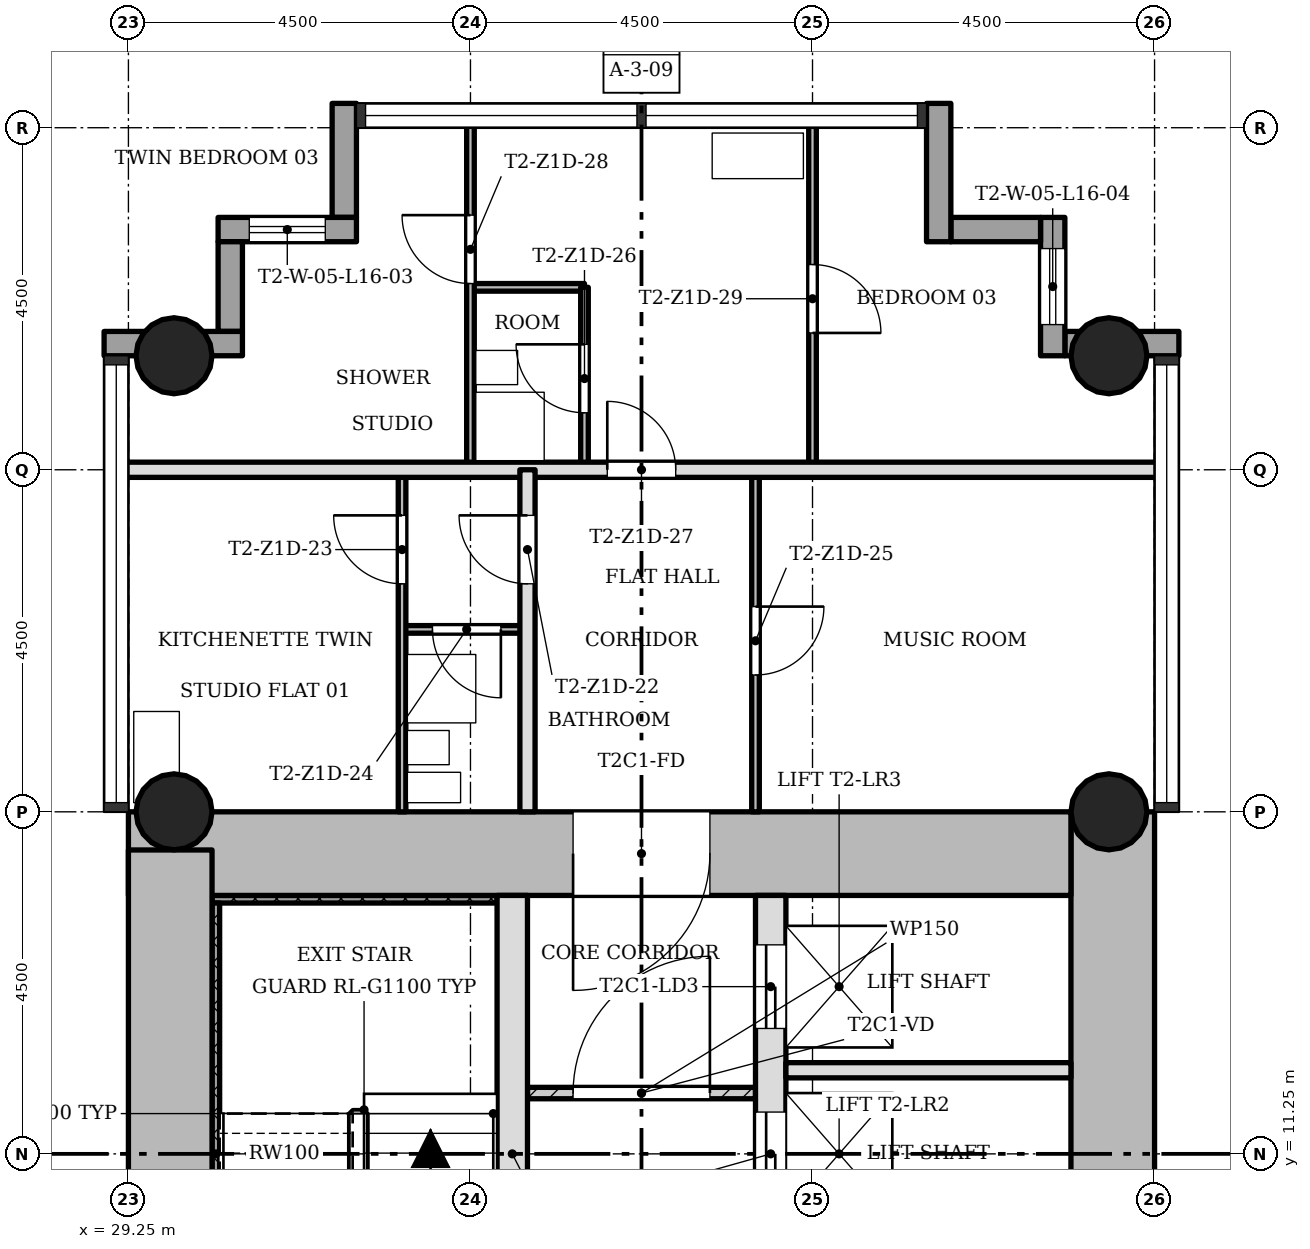
"""IFC4 building model, lengths in metres.
Left out: names, types, materials, properties, quantities, classifications, styles, units other than length and angle.
Written with IfcOpenShell. Run it as: python <this file> out.ifc"""

import sys

from ifc_helpers import new_model, si_unit, direction, frame, frame_2d, origin, origin_2d, place, context, subcontext, project, spatial, rectangle, hollow_circle, extrude, element, fill, save


model = new_model("IFC4")
c1 = context("Model", 3, precision=1e-05, world=origin(), true_north=direction((0.0, 1.0)))
c2 = subcontext(c1, "Body", "Model", "MODEL_VIEW")
j1 = project(units=[si_unit("LENGTHUNIT", "METRE"), si_unit("PLANEANGLEUNIT", "RADIAN")], contexts=[c1])
p1 = place(None, origin())
s1 = spatial("IfcSite", under=j1, at=p1, CompositionType="ELEMENT")
p2 = place(p1, origin())
s2 = spatial("IfcBuilding", under=s1, at=p2, CompositionType="ELEMENT")
p3 = place(p2, frame((0.0, 0.0, 61.9)))
s3 = spatial("IfcBuildingStorey", under=s2, at=p3, CompositionType="ELEMENT", Elevation=61.9)
p4 = place(p3, frame((42.2, 7.85, 0.0), z_axis=(0.0, 0.0, 1.0), x_axis=(0.0, 1.0, 0.0)))
e1 = element("IfcWall", 1, at=p4, inside=s3, PredefinedType="SHEAR", context=c2, shape_type="SweptSolid", body=[
    extrude(rectangle(XDim=7.9, YDim=1.1, at=frame_2d((3.95, 0.0))), origin(), (0.0, 0.0, 1.0), 3.4),
])
p5 = place(p3, frame((41.65, 15.2, 0.0), z_axis=(0.0, 0.0, 1.0), x_axis=(-1.0, 0.0, 0.0)))
e2 = element("IfcWall", 2, at=p5, inside=s3, PredefinedType="SHEAR", context=c2, shape_type="SweptSolid", body=[
    extrude(rectangle(XDim=12.4, YDim=1.1, at=frame_2d((6.2, 0.0))), origin(), (0.0, 0.0, 1.0), 3.4),
])
p6 = place(p5, frame((4.75, 0.0, 0.0)))
e3 = element("IfcOpeningElement", 3, at=p6, cuts=e2, PredefinedType="OPENING", context=c2, shape_type="SweptSolid", body=[
    extrude(rectangle(XDim=1.8, YDim=2.1, at=frame_2d((0.9, 1.05))), frame((0.0, 0.56, 0.0), z_axis=(0.0, -1.0, 0.0), x_axis=(1.0, 0.0, 0.0)), (0.0, 0.0, 1.0), 1.12),
])
p7 = place(p3, frame((29.8, 15.248, 0.0), z_axis=(0.0, 0.0, 1.0), x_axis=(0.0, -1.0, 0.0)))
e4 = element("IfcWall", 4, at=p7, inside=s3, PredefinedType="SHEAR", context=c2, shape_type="SweptSolid", body=[
    extrude(rectangle(XDim=8.596, YDim=1.1, at=frame_2d((4.298, 0.0))), origin(), (0.0, 0.0, 1.0), 3.4),
])
p8 = place(p3, frame((34.3, 7.85, 0.0), z_axis=(0.0, 0.0, 1.0), x_axis=(0.0, 1.0, 0.0)))
e5 = element("IfcWall", 5, at=p8, inside=s3, PredefinedType="SHEAR", context=c2, shape_type="SweptSolid", body=[
    extrude(rectangle(XDim=6.8, YDim=0.4, at=frame_2d((3.4, 0.0))), origin(), (0.0, 0.0, 1.0), 3.4),
])
p9 = place(p8, frame((0.55, 0.0, 0.0)))
e6 = element("IfcOpeningElement", 6, at=p9, cuts=e5, PredefinedType="OPENING", context=c2, shape_type="SweptSolid", body=[
    extrude(rectangle(XDim=0.9, YDim=2.1, at=frame_2d((0.45, 1.05))), frame((0.0, 0.21, 0.0), z_axis=(0.0, -1.0, 0.0), x_axis=(1.0, 0.0, 0.0)), (0.0, 0.0, 1.0), 0.42),
])
p10 = place(p3, frame((37.7, 7.85, 0.0), z_axis=(0.0, 0.0, 1.0), x_axis=(0.0, 1.0, 0.0)))
e7 = element("IfcWall", 7, at=p10, inside=s3, PredefinedType="SHEAR", context=c2, shape_type="SweptSolid", body=[
    extrude(rectangle(XDim=6.8, YDim=0.4, at=frame_2d((3.4, 0.0))), origin(), (0.0, 0.0, 1.0), 3.4),
])
p11 = place(p10, frame((0.65, 0.0, 0.0)))
e8 = element("IfcOpeningElement", 8, at=p11, cuts=e7, PredefinedType="OPENING", context=c2, shape_type="SweptSolid", body=[
    extrude(rectangle(XDim=1.1, YDim=2.1, at=frame_2d((0.55, 1.05))), frame((0.0, 0.21, 0.0), z_axis=(0.0, -1.0, 0.0), x_axis=(1.0, 0.0, 0.0)), (0.0, 0.0, 1.0), 0.42),
])
p12 = place(p10, frame((2.85, 0.0, 0.0)))
e9 = element("IfcOpeningElement", 9, at=p12, cuts=e7, PredefinedType="OPENING", context=c2, shape_type="SweptSolid", body=[
    extrude(rectangle(XDim=1.1, YDim=2.1, at=frame_2d((0.55, 1.05))), frame((0.0, 0.21, 0.0), z_axis=(0.0, -1.0, 0.0), x_axis=(1.0, 0.0, 0.0)), (0.0, 0.0, 1.0), 0.42),
])
p13 = place(p10, frame((5.05, 0.0, 0.0)))
e10 = element("IfcOpeningElement", 10, at=p13, cuts=e7, PredefinedType="OPENING", context=c2, shape_type="SweptSolid", body=[
    extrude(rectangle(XDim=1.1, YDim=2.1, at=frame_2d((0.55, 1.05))), frame((0.0, 0.21, 0.0), z_axis=(0.0, -1.0, 0.0), x_axis=(1.0, 0.0, 0.0)), (0.0, 0.0, 1.0), 0.42),
])
for number, where, z_axis, x_axis in (
    (11, (42.15, 15.75, 0.0), (0.0, 0.0, 1.0), (1.0, 0.0, 0.0)),
    (12, (29.85, 15.75, 0.0), (0.0, 0.0, 1.0), (1.0, 0.0, 0.0)),
    (13, (42.15, 21.75, 0.0), (0.0, 0.0, 1.0), (1.0, 0.0, 0.0)),
    (14, (29.85, 21.75, 0.0), (0.0, 0.0, 1.0), (1.0, 0.0, 0.0)),
):
    element("IfcColumn", number, at=place(p3, frame(where, z_axis=z_axis, x_axis=x_axis)), inside=s3, PredefinedType="COLUMN", context=c2, shape_type="SweptSolid", body=[
        extrude(hollow_circle(Radius=0.5, WallThickness=0.036, at=origin_2d()), origin(), (0.0, 0.0, 1.0), 3.4),
    ])
p14 = place(p3, frame((43.07, 21.91, -0.3), z_axis=(0.0, 0.0, 1.0), x_axis=(-1.0, 0.0, 0.0)))
e15 = element("IfcWall", 15, at=p14, inside=s3, PredefinedType="STANDARD", context=c2, shape_type="SweptSolid", body=[
    extrude(rectangle(XDim=1.5, YDim=0.32, at=frame_2d((0.75, 0.0))), origin(), (0.0, 0.0, 1.0), 3.4),
])
p15 = place(p3, frame((41.41, 21.75, -0.3), z_axis=(0.0, 0.0, 1.0), x_axis=(0.0, 1.0, 0.0)))
e16 = element("IfcWall", 16, at=p15, inside=s3, PredefinedType="STANDARD", context=c2, shape_type="SweptSolid", body=[
    extrude(rectangle(XDim=1.82, YDim=0.32, at=frame_2d((0.91, 0.0))), origin(), (0.0, 0.0, 1.0), 3.4),
])
p16 = place(p15, frame((0.41, 0.0, 1.2)))
e17 = element("IfcOpeningElement", 17, at=p16, cuts=e16, PredefinedType="OPENING", context=c2, shape_type="SweptSolid", body=[
    extrude(rectangle(XDim=1.0, YDim=1.5, at=frame_2d((0.5, 0.75))), frame((0.0, 0.17, 0.0), z_axis=(0.0, -1.0, 0.0), x_axis=(1.0, 0.0, 0.0)), (0.0, 0.0, 1.0), 0.34),
])
p17 = place(p3, frame((41.25, 23.41, -0.3), z_axis=(0.0, 0.0, 1.0), x_axis=(-1.0, 0.0, 0.0)))
e18 = element("IfcWall", 18, at=p17, inside=s3, PredefinedType="STANDARD", context=c2, shape_type="SweptSolid", body=[
    extrude(rectangle(XDim=1.18, YDim=0.32, at=frame_2d((0.59, 0.0))), origin(), (0.0, 0.0, 1.0), 3.4),
])
p18 = place(p3, frame((39.91, 23.25, -0.3), z_axis=(0.0, 0.0, 1.0), x_axis=(0.0, 1.0, 0.0)))
e19 = element("IfcWall", 19, at=p18, inside=s3, PredefinedType="STANDARD", context=c2, shape_type="SweptSolid", body=[
    extrude(rectangle(XDim=1.82, YDim=0.32, at=frame_2d((0.91, 0.0))), origin(), (0.0, 0.0, 1.0), 3.4),
])
p19 = place(p3, frame((32.09, 25.07, -0.3), z_axis=(0.0, 0.0, 1.0), x_axis=(0.0, -1.0, 0.0)))
e20 = element("IfcWall", 20, at=p19, inside=s3, PredefinedType="STANDARD", context=c2, shape_type="SweptSolid", body=[
    extrude(rectangle(XDim=1.5, YDim=0.32, at=frame_2d((0.75, 0.0))), origin(), (0.0, 0.0, 1.0), 3.4),
])
p20 = place(p3, frame((32.25, 23.41, -0.3), z_axis=(0.0, 0.0, 1.0), x_axis=(-1.0, 0.0, 0.0)))
e21 = element("IfcWall", 21, at=p20, inside=s3, PredefinedType="STANDARD", context=c2, shape_type="SweptSolid", body=[
    extrude(rectangle(XDim=1.82, YDim=0.32, at=frame_2d((0.91, 0.0))), origin(), (0.0, 0.0, 1.0), 3.4),
])
p21 = place(p20, frame((0.41, 0.0, 1.2)))
e22 = element("IfcOpeningElement", 22, at=p21, cuts=e21, PredefinedType="OPENING", context=c2, shape_type="SweptSolid", body=[
    extrude(rectangle(XDim=1.0, YDim=1.5, at=frame_2d((0.5, 0.75))), frame((0.0, 0.17, 0.0), z_axis=(0.0, -1.0, 0.0), x_axis=(1.0, 0.0, 0.0)), (0.0, 0.0, 1.0), 0.34),
])
p22 = place(p3, frame((30.59, 23.25, -0.3), z_axis=(0.0, 0.0, 1.0), x_axis=(0.0, -1.0, 0.0)))
e23 = element("IfcWall", 23, at=p22, inside=s3, PredefinedType="STANDARD", context=c2, shape_type="SweptSolid", body=[
    extrude(rectangle(XDim=1.18, YDim=0.32, at=frame_2d((0.59, 0.0))), origin(), (0.0, 0.0, 1.0), 3.4),
])
p23 = place(p3, frame((30.75, 21.91, -0.3), z_axis=(0.0, 0.0, 1.0), x_axis=(-1.0, 0.0, 0.0)))
e24 = element("IfcWall", 24, at=p23, inside=s3, PredefinedType="STANDARD", context=c2, shape_type="SweptSolid", body=[
    extrude(rectangle(XDim=1.82, YDim=0.32, at=frame_2d((0.91, 0.0))), origin(), (0.0, 0.0, 1.0), 3.4),
])
p24 = place(p3, frame((37.5, 12.05, 0.0), z_axis=(0.0, 0.0, 1.0), x_axis=(-1.0, 0.0, 0.0)))
e25 = element("IfcWall", 25, at=p24, inside=s3, PredefinedType="PARTITIONING", context=c2, shape_type="SweptSolid", body=[
    extrude(rectangle(XDim=3.0, YDim=0.15, at=frame_2d((1.5, 0.0))), origin(), (0.0, 0.0, 1.0), 3.0),
])
p25 = place(p24, frame((0.6, 0.0, 0.0)))
e26 = element("IfcOpeningElement", 26, at=p25, cuts=e25, PredefinedType="OPENING", context=c2, shape_type="SweptSolid", body=[
    extrude(rectangle(XDim=1.8, YDim=2.1, at=frame_2d((0.9, 1.05))), frame((0.0, 0.085, 0.0), z_axis=(0.0, -1.0, 0.0), x_axis=(1.0, 0.0, 0.0)), (0.0, 0.0, 1.0), 0.17),
])
p26 = place(p3, frame((41.65, 12.35, 0.0), z_axis=(0.0, 0.0, 1.0), x_axis=(-1.0, 0.0, 0.0)))
e27 = element("IfcWall", 27, at=p26, inside=s3, PredefinedType="SOLIDWALL", context=c2, shape_type="SweptSolid", body=[
    extrude(rectangle(XDim=3.75, YDim=0.2, at=frame_2d((1.875, 0.0))), origin(), (0.0, 0.0, 1.0), 3.0),
])
p27 = place(p3, frame((34.5, 18.15, 0.0), z_axis=(0.0, 0.0, 1.0), x_axis=(-1.0, 0.0, 0.0)))
e28 = element("IfcWall", 28, at=p27, inside=s3, PredefinedType="PARTITIONING", context=c2, shape_type="SweptSolid", body=[
    extrude(rectangle(XDim=1.65, YDim=0.1, at=frame_2d((0.825, 0.0))), origin(), (0.0, 0.0, 1.0), 3.0),
])
p28 = place(p27, frame((0.35, 0.0, 0.0)))
e29 = element("IfcOpeningElement", 29, at=p28, cuts=e28, PredefinedType="OPENING", context=c2, shape_type="SweptSolid", body=[
    extrude(rectangle(XDim=0.9, YDim=2.1, at=frame_2d((0.45, 1.05))), frame((0.0, 0.06, 0.0), z_axis=(0.0, -1.0, 0.0), x_axis=(1.0, 0.0, 0.0)), (0.0, 0.0, 1.0), 0.12),
])
p29 = place(p3, frame((42.85, 20.25, 0.0), z_axis=(0.0, 0.0, 1.0), x_axis=(-1.0, 0.0, 0.0)))
e30 = element("IfcWall", 30, at=p29, inside=s3, PredefinedType="SOLIDWALL", context=c2, shape_type="SweptSolid", body=[
    extrude(rectangle(XDim=13.7, YDim=0.2, at=frame_2d((6.85, 0.0))), origin(), (0.0, 0.0, 1.0), 3.0),
])
p30 = place(p29, frame((6.4, 0.0, 0.0)))
e31 = element("IfcOpeningElement", 31, at=p30, cuts=e30, PredefinedType="OPENING", context=c2, shape_type="SweptSolid", body=[
    extrude(rectangle(XDim=0.9, YDim=2.1, at=frame_2d((0.45, 1.05))), frame((0.0, 0.11, 0.0), z_axis=(0.0, -1.0, 0.0), x_axis=(1.0, 0.0, 0.0)), (0.0, 0.0, 1.0), 0.22),
])
p31 = place(p3, frame((35.25, 22.65, 0.0), z_axis=(0.0, 0.0, 1.0), x_axis=(-1.0, 0.0, 0.0)))
e32 = element("IfcWall", 32, at=p31, inside=s3, PredefinedType="PARTITIONING", context=c2, shape_type="SweptSolid", body=[
    extrude(rectangle(XDim=1.5, YDim=0.1, at=frame_2d((0.75, 0.0))), origin(), (0.0, 0.0, 1.0), 3.0),
])
p32 = place(p3, frame((38.25, 20.25, 0.0), z_axis=(0.0, 0.0, 1.0), x_axis=(0.0, 1.0, 0.0)))
e33 = element("IfcWall", 33, at=p32, inside=s3, PredefinedType="PARTITIONING", context=c2, shape_type="SweptSolid", body=[
    extrude(rectangle(XDim=4.6, YDim=0.1, at=frame_2d((2.3, 0.0))), origin(), (0.0, 0.0, 1.0), 3.0),
])
p33 = place(p32, frame((1.8, 0.0, 0.0)))
e34 = element("IfcOpeningElement", 34, at=p33, cuts=e33, PredefinedType="OPENING", context=c2, shape_type="SweptSolid", body=[
    extrude(rectangle(XDim=0.9, YDim=2.1, at=frame_2d((0.45, 1.05))), frame((0.0, 0.06, 0.0), z_axis=(0.0, -1.0, 0.0), x_axis=(1.0, 0.0, 0.0)), (0.0, 0.0, 1.0), 0.12),
])
p34 = place(p3, frame((37.5, 15.75, 0.0), z_axis=(0.0, 0.0, 1.0), x_axis=(0.0, 1.0, 0.0)))
e35 = element("IfcWall", 35, at=p34, inside=s3, PredefinedType="PARTITIONING", context=c2, shape_type="SweptSolid", body=[
    extrude(rectangle(XDim=4.5, YDim=0.1, at=frame_2d((2.25, 0.0))), origin(), (0.0, 0.0, 1.0), 3.0),
])
p35 = place(p34, frame((1.8, 0.0, 0.0)))
e36 = element("IfcOpeningElement", 36, at=p35, cuts=e35, PredefinedType="OPENING", context=c2, shape_type="SweptSolid", body=[
    extrude(rectangle(XDim=0.9, YDim=2.1, at=frame_2d((0.45, 1.05))), frame((0.0, 0.06, 0.0), z_axis=(0.0, -1.0, 0.0), x_axis=(1.0, 0.0, 0.0)), (0.0, 0.0, 1.0), 0.12),
])
p36 = place(p3, frame((35.25, 20.25, 0.0), z_axis=(0.0, 0.0, 1.0), x_axis=(0.0, 1.0, 0.0)))
e37 = element("IfcWall", 37, at=p36, inside=s3, PredefinedType="PARTITIONING", context=c2, shape_type="SweptSolid", body=[
    extrude(rectangle(XDim=2.4, YDim=0.1, at=frame_2d((1.2, 0.0))), origin(), (0.0, 0.0, 1.0), 3.0),
])
p37 = place(p36, frame((0.75, 0.0, 0.0)))
e38 = element("IfcOpeningElement", 38, at=p37, cuts=e37, PredefinedType="OPENING", context=c2, shape_type="SweptSolid", body=[
    extrude(rectangle(XDim=0.9, YDim=2.1, at=frame_2d((0.45, 1.05))), frame((0.0, 0.06, 0.0), z_axis=(0.0, -1.0, 0.0), x_axis=(1.0, 0.0, 0.0)), (0.0, 0.0, 1.0), 0.12),
])
p38 = place(p3, frame((34.5, 15.75, 0.0), z_axis=(0.0, 0.0, 1.0), x_axis=(0.0, 1.0, 0.0)))
e39 = element("IfcWall", 39, at=p38, inside=s3, PredefinedType="SOLIDWALL", context=c2, shape_type="SweptSolid", body=[
    extrude(rectangle(XDim=4.5, YDim=0.2, at=frame_2d((2.25, 0.0))), origin(), (0.0, 0.0, 1.0), 3.0),
])
p39 = place(p38, frame((3.0, 0.0, 0.0)))
e40 = element("IfcOpeningElement", 40, at=p39, cuts=e39, PredefinedType="OPENING", context=c2, shape_type="SweptSolid", body=[
    extrude(rectangle(XDim=0.9, YDim=2.1, at=frame_2d((0.45, 1.05))), frame((0.0, 0.11, 0.0), z_axis=(0.0, -1.0, 0.0), x_axis=(1.0, 0.0, 0.0)), (0.0, 0.0, 1.0), 0.22),
])
p40 = place(p3, frame((33.75, 20.25, 0.0), z_axis=(0.0, 0.0, 1.0), x_axis=(0.0, 1.0, 0.0)))
e41 = element("IfcWall", 41, at=p40, inside=s3, PredefinedType="PARTITIONING", context=c2, shape_type="SweptSolid", body=[
    extrude(rectangle(XDim=4.6, YDim=0.1, at=frame_2d((2.3, 0.0))), origin(), (0.0, 0.0, 1.0), 3.0),
])
p41 = place(p40, frame((2.45, 0.0, 0.0)))
e42 = element("IfcOpeningElement", 42, at=p41, cuts=e41, PredefinedType="OPENING", context=c2, shape_type="SweptSolid", body=[
    extrude(rectangle(XDim=0.9, YDim=2.1, at=frame_2d((0.45, 1.05))), frame((0.0, 0.06, 0.0), z_axis=(0.0, -1.0, 0.0), x_axis=(1.0, 0.0, 0.0)), (0.0, 0.0, 1.0), 0.12),
])
p42 = place(p3, frame((32.85, 15.75, 0.0), z_axis=(0.0, 0.0, 1.0), x_axis=(0.0, 1.0, 0.0)))
e43 = element("IfcWall", 43, at=p42, inside=s3, PredefinedType="PARTITIONING", context=c2, shape_type="SweptSolid", body=[
    extrude(rectangle(XDim=4.5, YDim=0.1, at=frame_2d((2.25, 0.0))), origin(), (0.0, 0.0, 1.0), 3.0),
])
p43 = place(p42, frame((3.0, 0.0, 0.0)))
e44 = element("IfcOpeningElement", 44, at=p43, cuts=e43, PredefinedType="OPENING", context=c2, shape_type="SweptSolid", body=[
    extrude(rectangle(XDim=0.9, YDim=2.1, at=frame_2d((0.45, 1.05))), frame((0.0, 0.06, 0.0), z_axis=(0.0, -1.0, 0.0), x_axis=(1.0, 0.0, 0.0)), (0.0, 0.0, 1.0), 0.12),
])
p44 = place(p3, frame((34.1, 14.6, 0.0), z_axis=(0.0, 0.0, 1.0), x_axis=(-1.0, 0.0, 0.0)))
e45 = element("IfcWall", 45, at=p44, inside=s3, PredefinedType="SHEAR", context=c2, shape_type="SweptSolid", body=[
    extrude(rectangle(XDim=3.75, YDim=0.1, at=frame_2d((1.875, 0.0))), origin(), (0.0, 0.0, 1.0), 3.4),
])
p45 = place(p3, frame((30.4, 7.95, 0.0), z_axis=(0.0, 0.0, 1.0), x_axis=(0.0, 1.0, 0.0)))
e46 = element("IfcWall", 46, at=p45, inside=s3, PredefinedType="SHEAR", context=c2, shape_type="SweptSolid", body=[
    extrude(rectangle(XDim=6.6, YDim=0.1, at=frame_2d((3.3, 0.0))), origin(), (0.0, 0.0, 1.0), 3.4),
])
p46 = place(p25, origin())
e47 = element("IfcDoor", 47, at=p46, inside=s3, OperationType="SINGLE_SWING_LEFT", PredefinedType="DOOR", context=c2, shape_type="SweptSolid", body=[
    extrude(rectangle(XDim=1.8, YDim=2.1, at=frame_2d((0.9, 1.05))), frame((0.0, 0.025, 0.0), z_axis=(0.0, -1.0, 0.0), x_axis=(1.0, 0.0, 0.0)), (0.0, 0.0, 1.0), 0.05),
])
fill(e26, e47)
p47 = place(p39, origin())
e48 = element("IfcDoor", 48, at=p47, inside=s3, OperationType="SINGLE_SWING_LEFT", PredefinedType="DOOR", context=c2, shape_type="SweptSolid", body=[
    extrude(rectangle(XDim=0.9, YDim=2.1, at=frame_2d((0.45, 1.05))), frame((0.0, 0.025, 0.0), z_axis=(0.0, -1.0, 0.0), x_axis=(1.0, 0.0, 0.0)), (0.0, 0.0, 1.0), 0.05),
])
fill(e40, e48)
p48 = place(p43, origin())
e49 = element("IfcDoor", 49, at=p48, inside=s3, OperationType="SINGLE_SWING_LEFT", PredefinedType="DOOR", context=c2, shape_type="SweptSolid", body=[
    extrude(rectangle(XDim=0.9, YDim=2.1, at=frame_2d((0.45, 1.05))), frame((0.0, 0.025, 0.0), z_axis=(0.0, -1.0, 0.0), x_axis=(1.0, 0.0, 0.0)), (0.0, 0.0, 1.0), 0.05),
])
fill(e44, e49)
p49 = place(p28, origin())
e50 = element("IfcDoor", 50, at=p49, inside=s3, OperationType="SINGLE_SWING_RIGHT", PredefinedType="DOOR", context=c2, shape_type="SweptSolid", body=[
    extrude(rectangle(XDim=0.9, YDim=2.1, at=frame_2d((0.45, 1.05))), frame((0.0, 0.025, 0.0), z_axis=(0.0, -1.0, 0.0), x_axis=(1.0, 0.0, 0.0)), (0.0, 0.0, 1.0), 0.05),
])
fill(e29, e50)
p50 = place(p35, origin())
e51 = element("IfcDoor", 51, at=p50, inside=s3, OperationType="SINGLE_SWING_RIGHT", PredefinedType="DOOR", context=c2, shape_type="SweptSolid", body=[
    extrude(rectangle(XDim=0.9, YDim=2.1, at=frame_2d((0.45, 1.05))), frame((0.0, 0.025, 0.0), z_axis=(0.0, -1.0, 0.0), x_axis=(1.0, 0.0, 0.0)), (0.0, 0.0, 1.0), 0.05),
])
fill(e36, e51)
p51 = place(p37, origin())
e52 = element("IfcDoor", 52, at=p51, inside=s3, OperationType="SINGLE_SWING_LEFT", PredefinedType="DOOR", context=c2, shape_type="SweptSolid", body=[
    extrude(rectangle(XDim=0.9, YDim=2.1, at=frame_2d((0.45, 1.05))), frame((0.0, 0.025, 0.0), z_axis=(0.0, -1.0, 0.0), x_axis=(1.0, 0.0, 0.0)), (0.0, 0.0, 1.0), 0.05),
])
fill(e38, e52)
p52 = place(p30, origin())
e53 = element("IfcDoor", 53, at=p52, inside=s3, OperationType="SINGLE_SWING_RIGHT", PredefinedType="DOOR", context=c2, shape_type="SweptSolid", body=[
    extrude(rectangle(XDim=0.9, YDim=2.1, at=frame_2d((0.45, 1.05))), frame((0.0, 0.025, 0.0), z_axis=(0.0, -1.0, 0.0), x_axis=(1.0, 0.0, 0.0)), (0.0, 0.0, 1.0), 0.05),
])
fill(e31, e53)
p53 = place(p41, origin())
e54 = element("IfcDoor", 54, at=p53, inside=s3, OperationType="SINGLE_SWING_LEFT", PredefinedType="DOOR", context=c2, shape_type="SweptSolid", body=[
    extrude(rectangle(XDim=0.9, YDim=2.1, at=frame_2d((0.45, 1.05))), frame((0.0, 0.025, 0.0), z_axis=(0.0, -1.0, 0.0), x_axis=(1.0, 0.0, 0.0)), (0.0, 0.0, 1.0), 0.05),
])
fill(e42, e54)
p54 = place(p33, origin())
e55 = element("IfcDoor", 55, at=p54, inside=s3, OperationType="SINGLE_SWING_LEFT", PredefinedType="DOOR", context=c2, shape_type="SweptSolid", body=[
    extrude(rectangle(XDim=0.9, YDim=2.1, at=frame_2d((0.45, 1.05))), frame((0.0, 0.025, 0.0), z_axis=(0.0, -1.0, 0.0), x_axis=(1.0, 0.0, 0.0)), (0.0, 0.0, 1.0), 0.05),
])
fill(e34, e55)
p55 = place(p12, origin())
e56 = element("IfcDoor", 56, at=p55, inside=s3, OperationType="SLIDING_TO_LEFT", PredefinedType="DOOR", context=c2, shape_type="SweptSolid", body=[
    extrude(rectangle(XDim=1.1, YDim=2.1, at=frame_2d((0.55, 1.05))), frame((0.0, 0.025, 0.0), z_axis=(0.0, -1.0, 0.0), x_axis=(1.0, 0.0, 0.0)), (0.0, 0.0, 1.0), 0.05),
])
fill(e9, e56)
p56 = place(p13, origin())
e57 = element("IfcDoor", 57, at=p56, inside=s3, OperationType="SLIDING_TO_LEFT", PredefinedType="DOOR", context=c2, shape_type="SweptSolid", body=[
    extrude(rectangle(XDim=1.1, YDim=2.1, at=frame_2d((0.55, 1.05))), frame((0.0, 0.025, 0.0), z_axis=(0.0, -1.0, 0.0), x_axis=(1.0, 0.0, 0.0)), (0.0, 0.0, 1.0), 0.05),
])
fill(e10, e57)
p57 = place(p6, origin())
e58 = element("IfcDoor", 58, at=p57, inside=s3, OperationType="SINGLE_SWING_LEFT", PredefinedType="DOOR", context=c2, shape_type="SweptSolid", body=[
    extrude(rectangle(XDim=1.8, YDim=2.1, at=frame_2d((0.9, 1.05))), frame((0.0, 0.025, 0.0), z_axis=(0.0, -1.0, 0.0), x_axis=(1.0, 0.0, 0.0)), (0.0, 0.0, 1.0), 0.05),
])
fill(e3, e58)
p58 = place(p21, origin())
e59 = element("IfcWindow", 59, at=p58, inside=s3, PartitioningType="SINGLE_PANEL", PredefinedType="WINDOW", context=c2, shape_type="SweptSolid", body=[
    extrude(rectangle(XDim=1.0, YDim=1.5, at=frame_2d((0.5, 0.75))), frame((0.0, 0.03, 0.0), z_axis=(0.0, -1.0, 0.0), x_axis=(1.0, 0.0, 0.0)), (0.0, 0.0, 1.0), 0.06),
])
fill(e22, e59)
p59 = place(p16, origin())
e60 = element("IfcWindow", 60, at=p59, inside=s3, PartitioningType="SINGLE_PANEL", PredefinedType="WINDOW", context=c2, shape_type="SweptSolid", body=[
    extrude(rectangle(XDim=1.0, YDim=1.5, at=frame_2d((0.5, 0.75))), frame((0.0, 0.03, 0.0), z_axis=(0.0, -1.0, 0.0), x_axis=(1.0, 0.0, 0.0)), (0.0, 0.0, 1.0), 0.06),
])
fill(e17, e60)
save(model, sys.argv[1])
